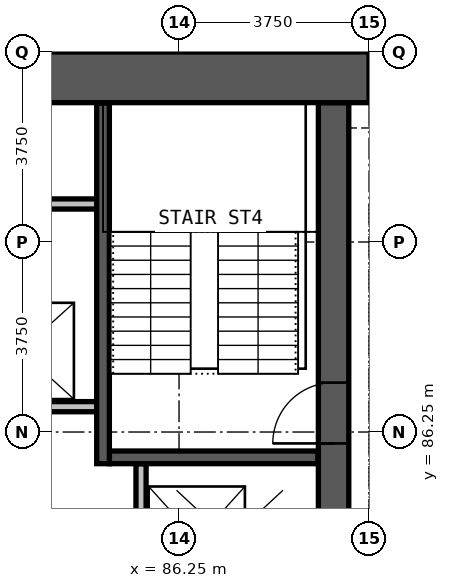
"""IFC4 building model, lengths in metres.
Left out: names, types, materials, properties, quantities, classifications, styles, units other than length and angle.
Written with IfcOpenShell. Run it as: python <this file> out.ifc"""

import sys

from ifc_helpers import new_model, si_unit, direction, frame, frame_2d, origin, place, context, subcontext, project, spatial, rectangle, extrude, element, fill, save


model = new_model("IFC4")
c1 = context("Model", 3, precision=1e-05, world=origin(), true_north=direction((0.0, 1.0)))
c2 = subcontext(c1, "Body", "Model", "MODEL_VIEW")
j1 = project(units=[si_unit("LENGTHUNIT", "METRE"), si_unit("PLANEANGLEUNIT", "RADIAN")], contexts=[c1])
p1 = place(None, origin())
s1 = spatial("IfcSite", under=j1, at=p1, CompositionType="ELEMENT")
p2 = place(p1, origin())
s2 = spatial("IfcBuilding", under=s1, at=p2, CompositionType="ELEMENT")
p3 = place(p2, frame((0.0, 0.0, 192.3)))
s3 = spatial("IfcBuildingStorey", under=s2, at=p3, CompositionType="ELEMENT", Elevation=192.3)
p4 = place(p3, frame((89.3, 72.25, 0.0), z_axis=(0.0, 0.0, 1.0), x_axis=(0.0, 1.0, 0.0)))
e1 = element("IfcWall", 1, at=p4, inside=s3, PredefinedType="SHEAR", context=c2, shape_type="SweptSolid", body=[
    extrude(rectangle(XDim=20.5, YDim=0.6, at=frame_2d((10.25, 0.0))), origin(), (0.0, 0.0, 1.0), 3.6),
])
p5 = place(p4, frame((0.275, 0.0, 0.0)))
e2 = element("IfcOpeningElement", 2, at=p5, cuts=e1, PredefinedType="OPENING", context=c2, shape_type="SweptSolid", body=[
    extrude(rectangle(XDim=1.2, YDim=2.2, at=frame_2d((0.6, 1.1))), frame((0.0, 0.31, 0.0), z_axis=(0.0, -1.0, 0.0), x_axis=(1.0, 0.0, 0.0)), (0.0, 0.0, 1.0), 0.62),
])
p6 = place(p4, frame((13.775, 0.0, 0.0)))
e3 = element("IfcOpeningElement", 3, at=p6, cuts=e1, PredefinedType="OPENING", context=c2, shape_type="SweptSolid", body=[
    extrude(rectangle(XDim=1.2, YDim=2.2, at=frame_2d((0.6, 1.1))), frame((0.0, 0.31, 0.0), z_axis=(0.0, -1.0, 0.0), x_axis=(1.0, 0.0, 0.0)), (0.0, 0.0, 1.0), 0.62),
])
p7 = place(p4, frame((7.875, 0.0, 0.0)))
e4 = element("IfcOpeningElement", 4, at=p7, cuts=e1, PredefinedType="OPENING", context=c2, shape_type="SweptSolid", body=[
    extrude(rectangle(XDim=1.5, YDim=2.2, at=frame_2d((0.75, 1.1))), frame((0.0, 0.31, 0.0), z_axis=(0.0, -1.0, 0.0), x_axis=(1.0, 0.0, 0.0)), (0.0, 0.0, 1.0), 0.62),
])
p8 = place(p3, frame((90.0, 93.25, 0.0), z_axis=(0.0, 0.0, 1.0), x_axis=(-1.0, 0.0, 0.0)))
e5 = element("IfcWall", 5, at=p8, inside=s3, PredefinedType="SHEAR", context=c2, shape_type="SweptSolid", body=[
    extrude(rectangle(XDim=30.0, YDim=1.0, at=frame_2d((15.0, 0.0))), origin(), (0.0, 0.0, 1.0), 3.6),
])
p9 = place(p3, frame((75.21, 86.75, 0.0), z_axis=(0.0, 0.0, 1.0), x_axis=(1.0, 0.0, 0.0)))
e6 = element("IfcWall", 6, at=p9, inside=s3, PredefinedType="PARTITIONING", context=c2, shape_type="SweptSolid", body=[
    extrude(rectangle(XDim=9.415, YDim=0.2, at=frame_2d((4.708, 0.0))), origin(), (0.0, 0.0, 1.0), 3.3),
])
p10 = place(p9, frame((0.95, 0.0, 0.0)))
e7 = element("IfcOpeningElement", 7, at=p10, cuts=e6, PredefinedType="OPENING", context=c2, shape_type="SweptSolid", body=[
    extrude(rectangle(XDim=1.1, YDim=2.2, at=frame_2d((0.55, 1.1))), frame((0.0, 0.11, 0.0), z_axis=(0.0, -1.0, 0.0), x_axis=(1.0, 0.0, 0.0)), (0.0, 0.0, 1.0), 0.22),
])
p11 = place(p9, frame((4.14, 0.0, 0.0)))
e8 = element("IfcOpeningElement", 8, at=p11, cuts=e6, PredefinedType="OPENING", context=c2, shape_type="SweptSolid", body=[
    extrude(rectangle(XDim=1.1, YDim=2.2, at=frame_2d((0.55, 1.1))), frame((0.0, 0.11, 0.0), z_axis=(0.0, -1.0, 0.0), x_axis=(1.0, 0.0, 0.0)), (0.0, 0.0, 1.0), 0.22),
])
p12 = place(p9, frame((7.29, 0.0, 0.0)))
e9 = element("IfcOpeningElement", 9, at=p12, cuts=e6, PredefinedType="OPENING", context=c2, shape_type="SweptSolid", body=[
    extrude(rectangle(XDim=1.1, YDim=2.2, at=frame_2d((0.55, 1.1))), frame((0.0, 0.11, 0.0), z_axis=(0.0, -1.0, 0.0), x_axis=(1.0, 0.0, 0.0)), (0.0, 0.0, 1.0), 0.22),
])
p13 = place(p3, frame((75.21, 90.75, 0.0), z_axis=(0.0, 0.0, 1.0), x_axis=(1.0, 0.0, 0.0)))
e10 = element("IfcWall", 10, at=p13, inside=s3, PredefinedType="PARTITIONING", context=c2, shape_type="SweptSolid", body=[
    extrude(rectangle(XDim=9.415, YDim=0.2, at=frame_2d((4.708, 0.0))), origin(), (0.0, 0.0, 1.0), 3.3),
])
p14 = place(p3, frame((85.5, 82.71, 0.0), z_axis=(0.0, 0.0, 1.0), x_axis=(0.0, 1.0, 0.0)))
e11 = element("IfcWall", 11, at=p14, inside=s3, PredefinedType="PARTITIONING", context=c2, shape_type="SweptSolid", body=[
    extrude(rectangle(XDim=2.915, YDim=0.2, at=frame_2d((1.458, 0.0))), origin(), (0.0, 0.0, 1.0), 3.3),
])
p15 = place(p14, frame((0.9, 0.0, 0.0)))
e12 = element("IfcOpeningElement", 12, at=p15, cuts=e11, PredefinedType="OPENING", context=c2, shape_type="SweptSolid", body=[
    extrude(rectangle(XDim=1.1, YDim=2.2, at=frame_2d((0.55, 1.1))), frame((0.0, 0.11, 0.0), z_axis=(0.0, -1.0, 0.0), x_axis=(1.0, 0.0, 0.0)), (0.0, 0.0, 1.0), 0.22),
])
p16 = place(p3, frame((84.875, 85.75, 0.0), z_axis=(0.0, 0.0, 1.0), x_axis=(1.0, 0.0, 0.0)))
e13 = element("IfcWall", 13, at=p16, inside=s3, PredefinedType="PARTITIONING", context=c2, shape_type="SweptSolid", body=[
    extrude(rectangle(XDim=4.115, YDim=0.25, at=frame_2d((2.058, 0.0))), origin(), (0.0, 0.0, 1.0), 3.3),
])
p17 = place(p3, frame((84.75, 85.625, 0.0), z_axis=(0.0, 0.0, 1.0), x_axis=(0.0, 1.0, 0.0)))
e14 = element("IfcWall", 14, at=p17, inside=s3, PredefinedType="PARTITIONING", context=c2, shape_type="SweptSolid", body=[
    extrude(rectangle(XDim=7.115, YDim=0.25, at=frame_2d((3.558, 0.0))), origin(), (0.0, 0.0, 1.0), 3.3),
])
p18 = place(p6, origin())
e15 = element("IfcDoor", 15, at=p18, inside=s3, OperationType="SINGLE_SWING_LEFT", PredefinedType="DOOR", context=c2, shape_type="SweptSolid", body=[
    extrude(rectangle(XDim=1.2, YDim=2.2, at=frame_2d((0.6, 1.1))), frame((0.0, 0.025, 0.0), z_axis=(0.0, -1.0, 0.0), x_axis=(1.0, 0.0, 0.0)), (0.0, 0.0, 1.0), 0.05),
])
fill(e3, e15)
save(model, sys.argv[1])
